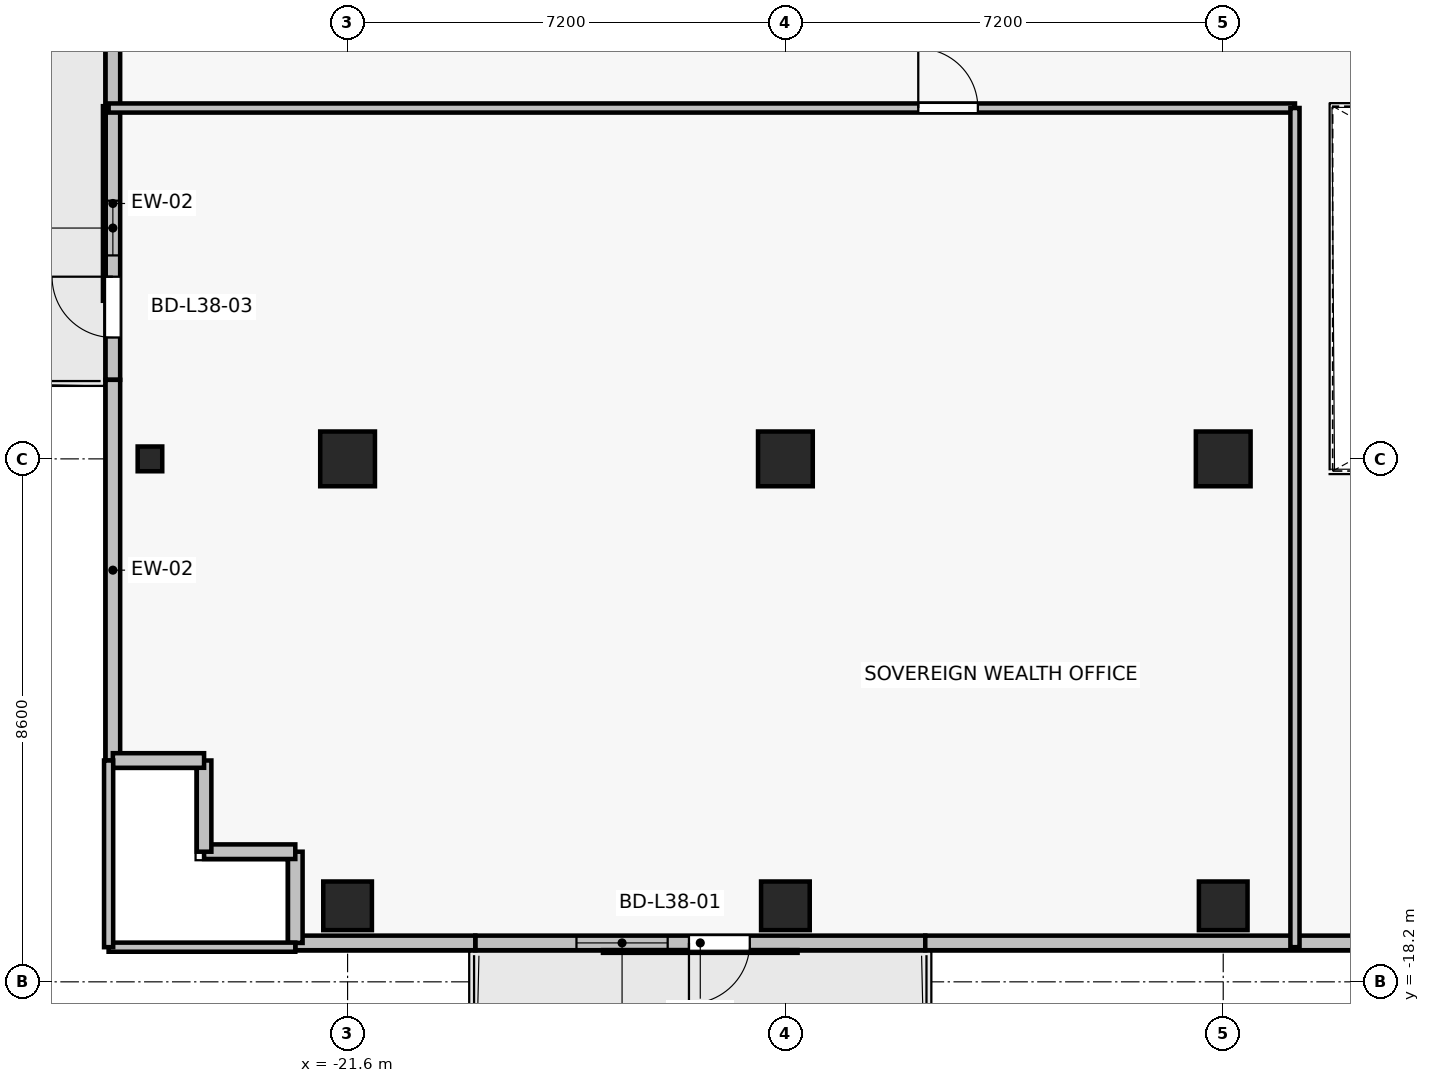
"""IFC4 building model, lengths in metres.
Left out: names, types, materials, properties, quantities, classifications, styles, units other than length and angle.
Written with IfcOpenShell. Run it as: python <this file> out.ifc"""

import sys

from ifc_helpers import new_model, si_unit, direction, frame, frame_2d, origin, origin_2d, place, context, subcontext, project, spatial, rectangle, i_section, extrude, source, transform, mapped, element, fill, save


model = new_model("IFC4")
c1 = context("Model", 3, precision=1e-05, world=origin(), true_north=direction((0.0, 1.0)))
c2 = subcontext(c1, "Body", "Model", "MODEL_VIEW")
j1 = project(units=[si_unit("LENGTHUNIT", "METRE"), si_unit("PLANEANGLEUNIT", "RADIAN")], contexts=[c1])
p1 = place(None, origin())
s1 = spatial("IfcSite", under=j1, at=p1, CompositionType="ELEMENT")
p2 = place(p1, origin())
s2 = spatial("IfcBuilding", under=s1, at=p2, CompositionType="ELEMENT")
p3 = place(p2, frame((0.0, 0.0, 136.3)))
s3 = spatial("IfcBuildingStorey", under=s2, at=p3, CompositionType="ELEMENT", Elevation=136.3)
for number, where, z_axis, x_axis in (
    (1, (-14.4, -9.6, 0.0), (0.0, 0.0, 1.0), (1.0, 0.0, 0.0)),
    (2, (-7.2, -9.6, 0.0), (0.0, 0.0, 1.0), (1.0, 0.0, 0.0)),
    (3, (-21.6, -9.6, 0.0), (0.0, 0.0, 1.0), (1.0, 0.0, 0.0)),
):
    element("IfcColumn", number, at=place(p3, frame(where, z_axis=z_axis, x_axis=x_axis)), inside=s3, PredefinedType="COLUMN", context=c2, shape_type="SweptSolid", body=[
        extrude(rectangle(XDim=0.9, YDim=0.9, at=origin_2d()), origin(), (0.0, 0.0, 1.0), 3.3),
    ])
for number, where, z_axis, x_axis in (
    (4, (-14.4, -16.95, 0.0), (0.0, 0.0, 1.0), (1.0, 0.0, 0.0)),
    (5, (-7.2, -16.95, 0.0), (0.0, 0.0, 1.0), (1.0, 0.0, 0.0)),
    (6, (-21.6, -16.95, 0.0), (0.0, 0.0, 1.0), (1.0, 0.0, 0.0)),
):
    element("IfcColumn", number, at=place(p3, frame(where, z_axis=z_axis, x_axis=x_axis)), inside=s3, PredefinedType="COLUMN", context=c2, shape_type="SweptSolid", body=[
        extrude(rectangle(XDim=0.8, YDim=0.8, at=origin_2d()), origin(), (0.0, 0.0, 1.0), 3.3),
    ])
p4 = place(p3, frame((-24.85, -9.6, 0.0), z_axis=(0.0, 0.0, 1.0), x_axis=(1.0, 0.0, 0.0)))
e7 = element("IfcColumn", 7, at=p4, inside=s3, PredefinedType="COLUMN", context=c2, shape_type="SweptSolid", body=[
    extrude(i_section(OverallWidth=0.404, OverallDepth=0.407, WebThickness=0.022, FlangeThickness=0.032, FilletRadius=0.015, at=origin_2d()), origin(), (0.0, 0.0, 1.0), 3.3),
])
p5 = place(p3, frame((-12.1, -17.56, 0.0), z_axis=(0.0, 0.0, 1.0), x_axis=(-1.0, 0.0, 0.0)))
e8 = element("IfcWall", 8, at=p5, inside=s3, PredefinedType="SOLIDWALL", context=c2, shape_type="SweptSolid", body=[
    extrude(rectangle(XDim=7.4, YDim=0.24, at=frame_2d((3.7, 0.0))), origin(), (0.0, 0.0, 1.0), 3.05),
])
p6 = place(p5, frame((2.886, 0.0, 0.0)))
e9 = element("IfcOpeningElement", 9, at=p6, cuts=e8, PredefinedType="OPENING", context=c2, shape_type="SweptSolid", body=[
    extrude(rectangle(XDim=1.0, YDim=2.2, at=frame_2d((0.5, 1.1))), frame((0.0, 0.13, 0.0), z_axis=(0.0, -1.0, 0.0), x_axis=(1.0, 0.0, 0.0)), (0.0, 0.0, 1.0), 0.26),
])
p7 = place(p5, frame((4.236, 0.0, 0.85)))
e10 = element("IfcOpeningElement", 10, at=p7, cuts=e8, PredefinedType="OPENING", context=c2, shape_type="SweptSolid", body=[
    extrude(rectangle(XDim=1.5, YDim=1.6, at=frame_2d((0.75, 0.8))), frame((0.0, 0.13, 0.0), z_axis=(0.0, -1.0, 0.0), x_axis=(1.0, 0.0, 0.0)), (0.0, 0.0, 1.0), 0.26),
])
p8 = place(p3, frame((-25.46, -8.3, 0.0), z_axis=(0.0, 0.0, 1.0), x_axis=(0.0, 1.0, 0.0)))
e11 = element("IfcWall", 11, at=p8, inside=s3, PredefinedType="SOLIDWALL", context=c2, shape_type="SweptSolid", body=[
    extrude(rectangle(XDim=5.8, YDim=0.24, at=frame_2d((2.9, 0.0))), origin(), (0.0, 0.0, 1.0), 3.05),
])
p9 = place(p8, frame((0.696, 0.0, 0.0)))
e12 = element("IfcOpeningElement", 12, at=p9, cuts=e11, PredefinedType="OPENING", context=c2, shape_type="SweptSolid", body=[
    extrude(rectangle(XDim=1.0, YDim=2.2, at=frame_2d((0.5, 1.1))), frame((0.0, 0.13, 0.0), z_axis=(0.0, -1.0, 0.0), x_axis=(1.0, 0.0, 0.0)), (0.0, 0.0, 1.0), 0.26),
])
p10 = place(p8, frame((2.046, 0.0, 0.85)))
e13 = element("IfcOpeningElement", 13, at=p10, cuts=e11, PredefinedType="OPENING", context=c2, shape_type="SweptSolid", body=[
    extrude(rectangle(XDim=0.9, YDim=1.35, at=frame_2d((0.45, 0.675))), frame((0.0, 0.13, 0.0), z_axis=(0.0, -1.0, 0.0), x_axis=(1.0, 0.0, 0.0)), (0.0, 0.0, 1.0), 0.26),
])
p11 = place(p3, frame((-25.46, -8.3, 0.0), z_axis=(0.0, 0.0, 1.0), x_axis=(0.0, -1.0, 0.0)))
e14 = element("IfcWall", 14, at=p11, inside=s3, PredefinedType="SOLIDWALL", context=c2, shape_type="SweptSolid", body=[
    extrude(rectangle(XDim=6.26, YDim=0.24, at=frame_2d((3.13, 0.0))), origin(), (0.0, 0.0, 1.0), 3.05),
])
p12 = place(p3, frame((-12.1, -17.56, 0.0), z_axis=(0.0, 0.0, 1.0), x_axis=(1.0, 0.0, 0.0)))
e15 = element("IfcWall", 15, at=p12, inside=s3, PredefinedType="SOLIDWALL", context=c2, shape_type="SweptSolid", body=[
    extrude(rectangle(XDim=8.76, YDim=0.24, at=frame_2d((4.38, 0.0))), origin(), (0.0, 0.0, 1.0), 3.05),
])
p13 = place(p3, frame((-22.46, -17.56, 0.0), z_axis=(0.0, 0.0, 1.0), x_axis=(1.0, 0.0, 0.0)))
e16 = element("IfcWall", 16, at=p13, inside=s3, PredefinedType="SOLIDWALL", context=c2, shape_type="SweptSolid", body=[
    extrude(rectangle(XDim=2.96, YDim=0.24, at=frame_2d((1.48, 0.0))), origin(), (0.0, 0.0, 1.0), 3.05),
])
p14 = place(p3, frame((-22.46, -16.06, 0.0), z_axis=(0.0, 0.0, 1.0), x_axis=(0.0, -1.0, 0.0)))
e17 = element("IfcWall", 17, at=p14, inside=s3, PredefinedType="SOLIDWALL", context=c2, shape_type="SweptSolid", body=[
    extrude(rectangle(XDim=1.5, YDim=0.24, at=frame_2d((0.75, 0.0))), origin(), (0.0, 0.0, 1.0), 2.54),
])
for number, where, z_axis, x_axis in (
    (18, (-23.96, -16.06, 0.0), (0.0, 0.0, 1.0), (1.0, 0.0, 0.0)),
    (19, (-23.96, -14.56, 0.0), (0.0, 0.0, 1.0), (0.0, -1.0, 0.0)),
    (20, (-25.46, -14.56, 0.0), (0.0, 0.0, 1.0), (1.0, 0.0, 0.0)),
):
    element("IfcWall", number, at=place(p3, frame(where, z_axis=z_axis, x_axis=x_axis)), inside=s3, PredefinedType="SOLIDWALL", context=c2, shape_type="SweptSolid", body=[
        extrude(rectangle(XDim=1.5, YDim=0.24, at=frame_2d((0.75, 0.0))), origin(), (0.0, 0.0, 1.0), 3.05),
    ])
p15 = place(p3, frame((-22.46, -17.63, 0.0), z_axis=(0.0, 0.0, 1.0), x_axis=(-1.0, 0.0, 0.0)))
e21 = element("IfcWall", 21, at=p15, inside=s3, PredefinedType="PARTITIONING", context=c2, shape_type="SweptSolid", body=[
    extrude(rectangle(XDim=3.07, YDim=0.15, at=frame_2d((1.535, 0.0))), origin(), (0.0, 0.0, 1.0), 3.05),
])
p16 = place(p3, frame((-25.53, -3.83, 0.0), z_axis=(0.0, 0.0, 1.0), x_axis=(1.0, 0.0, 0.0)))
e22 = element("IfcWall", 22, at=p16, inside=s3, PredefinedType="PARTITIONING", context=c2, shape_type="SweptSolid", body=[
    extrude(rectangle(XDim=19.51, YDim=0.15, at=frame_2d((9.755, 0.0))), origin(), (0.0, 0.0, 1.0), 2.49),
])
p17 = place(p16, frame((13.315, 0.0, 0.0)))
e23 = element("IfcOpeningElement", 23, at=p17, cuts=e22, PredefinedType="OPENING", context=c2, shape_type="SweptSolid", body=[
    extrude(rectangle(XDim=0.98, YDim=2.15, at=frame_2d((0.49, 1.075))), frame((0.0, 0.085, 0.0), z_axis=(0.0, -1.0, 0.0), x_axis=(1.0, 0.0, 0.0)), (0.0, 0.0, 1.0), 0.17),
])
p18 = place(p3, frame((-25.53, -17.63, 0.0), z_axis=(0.0, 0.0, 1.0), x_axis=(0.0, 1.0, 0.0)))
e24 = element("IfcWall", 24, at=p18, inside=s3, PredefinedType="PARTITIONING", context=c2, shape_type="SweptSolid", body=[
    extrude(rectangle(XDim=3.07, YDim=0.15, at=frame_2d((1.535, 0.0))), origin(), (0.0, 0.0, 1.0), 3.05),
])
p19 = place(p3, frame((-6.02, -3.83, 0.0), z_axis=(0.0, 0.0, 1.0), x_axis=(0.0, -1.0, 0.0)))
e25 = element("IfcWall", 25, at=p19, inside=s3, PredefinedType="PARTITIONING", context=c2, shape_type="SweptSolid", body=[
    extrude(rectangle(XDim=13.8, YDim=0.15, at=frame_2d((6.9, 0.0))), origin(), (0.0, 0.0, 1.0), 2.49),
])
m1 = source(origin(), c2, "Body", "SweptSolid", [
    extrude(rectangle(XDim=1.0, YDim=2.2, at=frame_2d((0.5, 1.1))), frame((0.0, 0.025, 0.0), z_axis=(0.0, -1.0, 0.0), x_axis=(1.0, 0.0, 0.0)), (0.0, 0.0, 1.0), 0.05),
])
p20 = place(p6, origin())
e26 = element("IfcDoor", 26, at=p20, inside=s3, OperationType="SINGLE_SWING_RIGHT", PredefinedType="DOOR", context=c2, shape_type="MappedRepresentation", body=[
    mapped(m1, transform((0.0, 0.0, 0.0), x_axis=(1.0, 0.0, 0.0), y_axis=(0.0, 1.0, 0.0), z_axis=(0.0, 0.0, 1.0), scale=1.0)),
])
fill(e9, e26)
m2 = source(origin(), c2, "Body", "SweptSolid", [
    extrude(rectangle(XDim=1.5, YDim=1.6, at=frame_2d((0.75, 0.8))), frame((0.0, 0.03, 0.0), z_axis=(0.0, -1.0, 0.0), x_axis=(1.0, 0.0, 0.0)), (0.0, 0.0, 1.0), 0.06),
])
p21 = place(p7, origin())
e27 = element("IfcWindow", 27, at=p21, inside=s3, PartitioningType="SINGLE_PANEL", PredefinedType="WINDOW", context=c2, shape_type="MappedRepresentation", body=[
    mapped(m2, transform((0.0, 0.0, 0.0), x_axis=(1.0, 0.0, 0.0), y_axis=(0.0, 1.0, 0.0), z_axis=(0.0, 0.0, 1.0), scale=1.0)),
])
fill(e10, e27)
p22 = place(p9, origin())
e28 = element("IfcDoor", 28, at=p22, inside=s3, OperationType="SINGLE_SWING_RIGHT", PredefinedType="DOOR", context=c2, shape_type="MappedRepresentation", body=[
    mapped(m1, transform((0.0, 0.0, 0.0), x_axis=(1.0, 0.0, 0.0), y_axis=(0.0, 1.0, 0.0), z_axis=(0.0, 0.0, 1.0), scale=1.0)),
])
fill(e12, e28)
m3 = source(origin(), c2, "Body", "SweptSolid", [
    extrude(rectangle(XDim=0.9, YDim=1.35, at=frame_2d((0.45, 0.675))), frame((0.0, 0.03, 0.0), z_axis=(0.0, -1.0, 0.0), x_axis=(1.0, 0.0, 0.0)), (0.0, 0.0, 1.0), 0.06),
])
p23 = place(p10, origin())
e29 = element("IfcWindow", 29, at=p23, inside=s3, PartitioningType="SINGLE_PANEL", PredefinedType="WINDOW", context=c2, shape_type="MappedRepresentation", body=[
    mapped(m3, transform((0.0, 0.0, 0.0), x_axis=(1.0, 0.0, 0.0), y_axis=(0.0, 1.0, 0.0), z_axis=(0.0, 0.0, 1.0), scale=1.0)),
])
fill(e13, e29)
m4 = source(origin(), c2, "Body", "SweptSolid", [
    extrude(rectangle(XDim=0.98, YDim=2.15, at=frame_2d((0.49, 1.075))), frame((0.0, 0.025, 0.0), z_axis=(0.0, -1.0, 0.0), x_axis=(1.0, 0.0, 0.0)), (0.0, 0.0, 1.0), 0.05),
])
p24 = place(p17, origin())
e30 = element("IfcDoor", 30, at=p24, inside=s3, OperationType="SINGLE_SWING_LEFT", PredefinedType="DOOR", context=c2, shape_type="MappedRepresentation", body=[
    mapped(m4, transform((0.0, 0.0, 0.0), x_axis=(1.0, 0.0, 0.0), y_axis=(0.0, 1.0, 0.0), z_axis=(0.0, 0.0, 1.0), scale=1.0)),
])
fill(e23, e30)
save(model, sys.argv[1])
